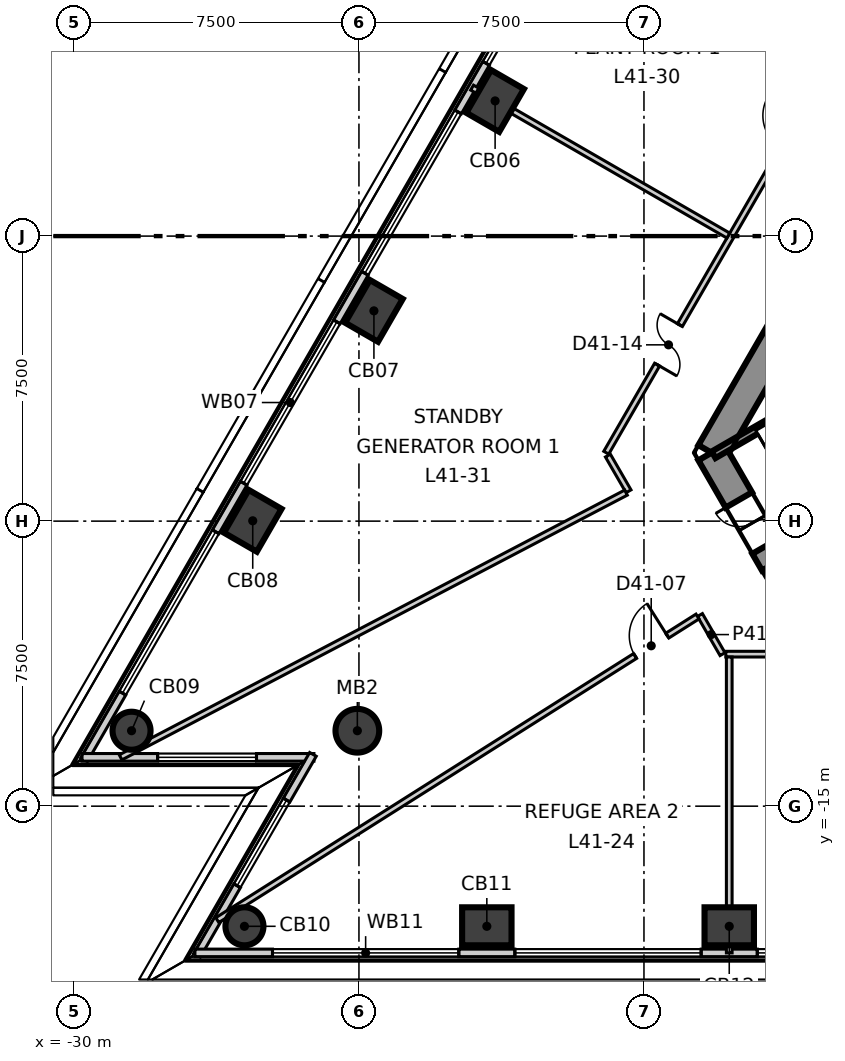
"""IFC4 building model, lengths in metres.
Left out: names, types, materials, properties, quantities, classifications, styles, units other than length and angle.
Written with IfcOpenShell. Run it as: python <this file> out.ifc"""

import sys

from ifc_helpers import new_model, si_unit, direction, frame, frame_2d, origin, origin_2d, place, context, subcontext, project, spatial, polyline, rectangle, circle, outline, extrude, element, fill, save


model = new_model("IFC4")
c1 = context("Model", 3, precision=1e-05, world=origin(), true_north=direction((0.0, 1.0)))
c2 = subcontext(c1, "Body", "Model", "MODEL_VIEW")
j1 = project(units=[si_unit("LENGTHUNIT", "METRE"), si_unit("PLANEANGLEUNIT", "RADIAN")], contexts=[c1])
p1 = place(None, origin())
s1 = spatial("IfcSite", under=j1, at=p1, CompositionType="ELEMENT")
p2 = place(p1, origin())
s2 = spatial("IfcBuilding", under=s1, at=p2, CompositionType="ELEMENT")
p3 = place(p2, frame((0.0, 0.0, 176.3)))
s3 = spatial("IfcBuildingStorey", under=s2, at=p3, CompositionType="ELEMENT", Elevation=176.3)
p4 = place(p3, frame((-1.674, 14.3, -0.3), z_axis=(0.0, 0.0, 1.0), x_axis=(-0.499995765644, -0.866027848477, 0.0)))
e1 = element("IfcWall", 1, at=p4, inside=s3, PredefinedType="SHEAR", context=c2, shape_type="SweptSolid", body=[
    extrude(outline(polyline([(-0.231, -0.4), (1.732, -0.4), (3.695, -0.4), (5.658, -0.4), (7.621, -0.4), (9.584, -0.4), (11.547, -0.4), (13.51, -0.4), (15.473, -0.4), (17.436, -0.4), (19.399, -0.4), (21.362, -0.4), (23.325, -0.4), (22.863, 0.4), (20.977, 0.4), (19.091, 0.4), (17.205, 0.4), (15.319, 0.4), (13.433, 0.4), (11.547, 0.4), (9.661, 0.4), (7.775, 0.4), (5.889, 0.4), (4.003, 0.4), (2.117, 0.4), (0.231, 0.4), (-0.231, -0.4)])), origin(), (0.0, 0.0, 1.0), 4.2),
])
p5 = place(p4, frame((10.997, 0.0, 0.3)))
e2 = element("IfcOpeningElement", 2, at=p5, cuts=e1, PredefinedType="OPENING", context=c2, shape_type="SweptSolid", body=[
    extrude(rectangle(XDim=1.1, YDim=2.1, at=frame_2d((0.55, 1.05))), frame((0.0, 0.41, 0.0), z_axis=(0.0, -1.0, 0.0), x_axis=(1.0, 0.0, 0.0)), (0.0, 0.0, 1.0), 0.82),
])
p6 = place(p3, frame((-13.221, -5.7, -0.3), z_axis=(0.0, 0.0, 1.0), x_axis=(0.49987182685, -0.866099391942, 0.0)))
e3 = element("IfcWall", 3, at=p6, inside=s3, PredefinedType="SHEAR", context=c2, shape_type="SweptSolid", body=[
    extrude(outline(polyline([(-0.231, -0.4), (1.674, -0.4), (3.579, -0.4), (3.118, 0.4), (1.674, 0.4), (0.231, 0.4), (-0.231, -0.4)])), origin(), (0.0, 0.0, 1.0), 4.2),
])
p7 = place(p6, frame((1.437, 0.0, 0.3)))
e4 = element("IfcOpeningElement", 4, at=p7, cuts=e3, PredefinedType="OPENING", context=c2, shape_type="SweptSolid", body=[
    extrude(rectangle(XDim=1.4, YDim=2.1, at=frame_2d((0.7, 1.05))), frame((0.0, 0.41, 0.0), z_axis=(0.0, -1.0, 0.0), x_axis=(1.0, 0.0, 0.0)), (0.0, 0.0, 1.0), 0.82),
])
for number, where, z_axis, x_axis in (
    (5, (-18.917, 3.557, -0.3), (0.0, 0.0, 1.0), (0.5, 0.866, 0.0)),
    (6, (-22.106, -1.967, -0.3), (0.0, 0.0, 1.0), (0.5, 0.866, 0.0)),
    (7, (-25.295, -7.491, -0.3), (0.0, 0.0, 1.0), (0.5, 0.866, 0.0)),
):
    element("IfcColumn", number, at=place(p3, frame(where, z_axis=z_axis, x_axis=x_axis)), inside=s3, PredefinedType="COLUMN", context=c2, shape_type="SweptSolid", body=[
        extrude(rectangle(XDim=1.3, YDim=1.0, at=origin_2d()), origin(), (0.0, 0.0, 1.0), 4.2),
    ])
for number, where, z_axis, x_axis in (
    (8, (-28.484, -13.015, -0.3), (0.0, 0.0, 1.0), (0.5, 0.866, 0.0)),
    (9, (-25.513, -18.161, -0.3), (0.0, 0.0, 1.0), (1.0, 0.0, 0.0)),
):
    element("IfcColumn", number, at=place(p3, frame(where, z_axis=z_axis, x_axis=x_axis)), inside=s3, PredefinedType="COLUMN", context=c2, shape_type="SweptSolid", body=[
        extrude(circle(Radius=0.5, at=origin_2d()), origin(), (0.0, 0.0, 1.0), 4.2),
    ])
for number, where, z_axis, x_axis in (
    (10, (-19.135, -18.161, -0.3), (0.0, 0.0, 1.0), (1.0, 0.0, 0.0)),
    (11, (-12.756, -18.161, -0.3), (0.0, 0.0, 1.0), (1.0, 0.0, 0.0)),
):
    element("IfcColumn", number, at=place(p3, frame(where, z_axis=z_axis, x_axis=x_axis)), inside=s3, PredefinedType="COLUMN", context=c2, shape_type="SweptSolid", body=[
        extrude(rectangle(XDim=1.3, YDim=1.0, at=origin_2d()), origin(), (0.0, 0.0, 1.0), 4.2),
    ])
p8 = place(p3, frame((-22.542, -13.015, -0.3), z_axis=(0.0, 0.0, 1.0), x_axis=(1.0, 0.0, 0.0)))
e12 = element("IfcColumn", 12, at=p8, inside=s3, PredefinedType="COLUMN", context=c2, shape_type="SweptSolid", body=[
    extrude(circle(Radius=0.575, at=origin_2d()), origin(), (0.0, 0.0, 1.0), 4.2),
])
p9 = place(p3, frame((-2.926, 32.654, 0.0), z_axis=(0.0, 0.0, 1.0), x_axis=(-0.499994049952, -0.866028839019, 0.0)))
e13 = element("IfcWall", 13, at=p9, inside=s3, PredefinedType="ELEMENTEDWALL", context=c2, shape_type="SweptSolid", body=[
    extrude(rectangle(XDim=53.613, YDim=0.2, at=frame_2d((26.806, 0.0))), origin(), (0.0, 0.0, 1.0), 3.9),
])
p10 = place(p9, frame((2.042, 0.0, 0.9)))
e14 = element("IfcOpeningElement", 14, at=p10, cuts=e13, PredefinedType="OPENING", context=c2, shape_type="SweptSolid", body=[
    extrude(rectangle(XDim=4.9, YDim=2.5, at=frame_2d((2.45, 1.25))), frame((0.0, 0.11, 0.0), z_axis=(0.0, -1.0, 0.0), x_axis=(1.0, 0.0, 0.0)), (0.0, 0.0, 1.0), 0.22),
])
p11 = place(p9, frame((8.42, 0.0, 0.9)))
e15 = element("IfcOpeningElement", 15, at=p11, cuts=e13, PredefinedType="OPENING", context=c2, shape_type="SweptSolid", body=[
    extrude(rectangle(XDim=4.9, YDim=2.5, at=frame_2d((2.45, 1.25))), frame((0.0, 0.11, 0.0), z_axis=(0.0, -1.0, 0.0), x_axis=(1.0, 0.0, 0.0)), (0.0, 0.0, 1.0), 0.22),
])
p12 = place(p9, frame((14.798, 0.0, 0.9)))
e16 = element("IfcOpeningElement", 16, at=p12, cuts=e13, PredefinedType="OPENING", context=c2, shape_type="SweptSolid", body=[
    extrude(rectangle(XDim=4.9, YDim=2.5, at=frame_2d((2.45, 1.25))), frame((0.0, 0.11, 0.0), z_axis=(0.0, -1.0, 0.0), x_axis=(1.0, 0.0, 0.0)), (0.0, 0.0, 1.0), 0.22),
])
p13 = place(p9, frame((21.177, 0.0, 0.9)))
e17 = element("IfcOpeningElement", 17, at=p13, cuts=e13, PredefinedType="OPENING", context=c2, shape_type="SweptSolid", body=[
    extrude(rectangle(XDim=4.9, YDim=2.5, at=frame_2d((2.45, 1.25))), frame((0.0, 0.11, 0.0), z_axis=(0.0, -1.0, 0.0), x_axis=(1.0, 0.0, 0.0)), (0.0, 0.0, 1.0), 0.22),
])
p14 = place(p9, frame((27.555, 0.0, 0.9)))
e18 = element("IfcOpeningElement", 18, at=p14, cuts=e13, PredefinedType="OPENING", context=c2, shape_type="SweptSolid", body=[
    extrude(rectangle(XDim=4.9, YDim=2.5, at=frame_2d((2.45, 1.25))), frame((0.0, 0.11, 0.0), z_axis=(0.0, -1.0, 0.0), x_axis=(1.0, 0.0, 0.0)), (0.0, 0.0, 1.0), 0.22),
])
p15 = place(p9, frame((33.934, 0.0, 0.9)))
e19 = element("IfcOpeningElement", 19, at=p15, cuts=e13, PredefinedType="OPENING", context=c2, shape_type="SweptSolid", body=[
    extrude(rectangle(XDim=4.9, YDim=2.5, at=frame_2d((2.45, 1.25))), frame((0.0, 0.11, 0.0), z_axis=(0.0, -1.0, 0.0), x_axis=(1.0, 0.0, 0.0)), (0.0, 0.0, 1.0), 0.22),
])
p16 = place(p9, frame((40.312, 0.0, 0.9)))
e20 = element("IfcOpeningElement", 20, at=p16, cuts=e13, PredefinedType="OPENING", context=c2, shape_type="SweptSolid", body=[
    extrude(rectangle(XDim=4.9, YDim=2.5, at=frame_2d((2.45, 1.25))), frame((0.0, 0.11, 0.0), z_axis=(0.0, -1.0, 0.0), x_axis=(1.0, 0.0, 0.0)), (0.0, 0.0, 1.0), 0.22),
])
p17 = place(p9, frame((46.69, 0.0, 0.9)))
e21 = element("IfcOpeningElement", 21, at=p17, cuts=e13, PredefinedType="OPENING", context=c2, shape_type="SweptSolid", body=[
    extrude(rectangle(XDim=4.9, YDim=2.5, at=frame_2d((2.45, 1.25))), frame((0.0, 0.11, 0.0), z_axis=(0.0, -1.0, 0.0), x_axis=(1.0, 0.0, 0.0)), (0.0, 0.0, 1.0), 0.22),
])
p18 = place(p3, frame((-29.787, -13.715, 0.0), z_axis=(0.0, 0.0, 1.0), x_axis=(1.0, 0.0, 0.0)))
e22 = element("IfcWall", 22, at=p18, inside=s3, PredefinedType="ELEMENTEDWALL", context=c2, shape_type="SweptSolid", body=[
    extrude(rectangle(XDim=6.102, YDim=0.2, at=frame_2d((3.051, 0.0))), origin(), (0.0, 0.0, 1.0), 3.9),
])
p19 = place(p18, frame((1.99, 0.0, 0.9)))
e23 = element("IfcOpeningElement", 23, at=p19, cuts=e22, PredefinedType="OPENING", context=c2, shape_type="SweptSolid", body=[
    extrude(rectangle(XDim=2.6, YDim=2.5, at=frame_2d((1.3, 1.25))), frame((0.0, 0.11, 0.0), z_axis=(0.0, -1.0, 0.0), x_axis=(1.0, 0.0, 0.0)), (0.0, 0.0, 1.0), 0.22),
])
p20 = place(p3, frame((-23.71, -13.637, 0.0), z_axis=(0.0, 0.0, 1.0), x_axis=(-0.49995563381, -0.866051017101, 0.0)))
e24 = element("IfcWall", 24, at=p20, inside=s3, PredefinedType="ELEMENTEDWALL", context=c2, shape_type="SweptSolid", body=[
    extrude(rectangle(XDim=6.103, YDim=0.2, at=frame_2d((3.051, 0.0))), origin(), (0.0, 0.0, 1.0), 3.9),
])
p21 = place(p20, frame((1.39, 0.0, 0.9)))
e25 = element("IfcOpeningElement", 25, at=p21, cuts=e24, PredefinedType="OPENING", context=c2, shape_type="SweptSolid", body=[
    extrude(rectangle(XDim=2.6, YDim=2.5, at=frame_2d((1.3, 1.25))), frame((0.0, 0.11, 0.0), z_axis=(0.0, -1.0, 0.0), x_axis=(1.0, 0.0, 0.0)), (0.0, 0.0, 1.0), 0.22),
])
p22 = place(p3, frame((-26.816, -18.861, 0.0), z_axis=(0.0, 0.0, 1.0), x_axis=(1.0, 0.0, 0.0)))
e26 = element("IfcWall", 26, at=p22, inside=s3, PredefinedType="ELEMENTEDWALL", context=c2, shape_type="SweptSolid", body=[
    extrude(rectangle(XDim=53.612, YDim=0.2, at=frame_2d((26.806, 0.0))), origin(), (0.0, 0.0, 1.0), 3.9),
])
p23 = place(p22, frame((2.042, 0.0, 0.9)))
e27 = element("IfcOpeningElement", 27, at=p23, cuts=e26, PredefinedType="OPENING", context=c2, shape_type="SweptSolid", body=[
    extrude(rectangle(XDim=4.9, YDim=2.5, at=frame_2d((2.45, 1.25))), frame((0.0, 0.11, 0.0), z_axis=(0.0, -1.0, 0.0), x_axis=(1.0, 0.0, 0.0)), (0.0, 0.0, 1.0), 0.22),
])
p24 = place(p22, frame((8.42, 0.0, 0.9)))
e28 = element("IfcOpeningElement", 28, at=p24, cuts=e26, PredefinedType="OPENING", context=c2, shape_type="SweptSolid", body=[
    extrude(rectangle(XDim=4.9, YDim=2.5, at=frame_2d((2.45, 1.25))), frame((0.0, 0.11, 0.0), z_axis=(0.0, -1.0, 0.0), x_axis=(1.0, 0.0, 0.0)), (0.0, 0.0, 1.0), 0.22),
])
p25 = place(p22, frame((14.799, 0.0, 0.9)))
e29 = element("IfcOpeningElement", 29, at=p25, cuts=e26, PredefinedType="OPENING", context=c2, shape_type="SweptSolid", body=[
    extrude(rectangle(XDim=4.9, YDim=2.5, at=frame_2d((2.45, 1.25))), frame((0.0, 0.11, 0.0), z_axis=(0.0, -1.0, 0.0), x_axis=(1.0, 0.0, 0.0)), (0.0, 0.0, 1.0), 0.22),
])
p26 = place(p22, frame((21.177, 0.0, 0.9)))
e30 = element("IfcOpeningElement", 30, at=p26, cuts=e26, PredefinedType="OPENING", context=c2, shape_type="SweptSolid", body=[
    extrude(rectangle(XDim=4.9, YDim=2.5, at=frame_2d((2.45, 1.25))), frame((0.0, 0.11, 0.0), z_axis=(0.0, -1.0, 0.0), x_axis=(1.0, 0.0, 0.0)), (0.0, 0.0, 1.0), 0.22),
])
p27 = place(p22, frame((27.555, 0.0, 0.9)))
e31 = element("IfcOpeningElement", 31, at=p27, cuts=e26, PredefinedType="OPENING", context=c2, shape_type="SweptSolid", body=[
    extrude(rectangle(XDim=4.9, YDim=2.5, at=frame_2d((2.45, 1.25))), frame((0.0, 0.11, 0.0), z_axis=(0.0, -1.0, 0.0), x_axis=(1.0, 0.0, 0.0)), (0.0, 0.0, 1.0), 0.22),
])
p28 = place(p22, frame((33.933, 0.0, 0.9)))
e32 = element("IfcOpeningElement", 32, at=p28, cuts=e26, PredefinedType="OPENING", context=c2, shape_type="SweptSolid", body=[
    extrude(rectangle(XDim=4.9, YDim=2.5, at=frame_2d((2.45, 1.25))), frame((0.0, 0.11, 0.0), z_axis=(0.0, -1.0, 0.0), x_axis=(1.0, 0.0, 0.0)), (0.0, 0.0, 1.0), 0.22),
])
p29 = place(p22, frame((40.312, 0.0, 0.9)))
e33 = element("IfcOpeningElement", 33, at=p29, cuts=e26, PredefinedType="OPENING", context=c2, shape_type="SweptSolid", body=[
    extrude(rectangle(XDim=4.9, YDim=2.5, at=frame_2d((2.45, 1.25))), frame((0.0, 0.11, 0.0), z_axis=(0.0, -1.0, 0.0), x_axis=(1.0, 0.0, 0.0)), (0.0, 0.0, 1.0), 0.22),
])
p30 = place(p22, frame((46.69, 0.0, 0.9)))
e34 = element("IfcOpeningElement", 34, at=p30, cuts=e26, PredefinedType="OPENING", context=c2, shape_type="SweptSolid", body=[
    extrude(rectangle(XDim=4.9, YDim=2.5, at=frame_2d((2.45, 1.25))), frame((0.0, 0.11, 0.0), z_axis=(0.0, -1.0, 0.0), x_axis=(1.0, 0.0, 0.0)), (0.0, 0.0, 1.0), 0.22),
])
p31 = place(p3, frame((-15.993, -5.7, 0.0), z_axis=(0.0, 0.0, 1.0), x_axis=(0.500007877715, 0.866020855536, 0.0)))
e35 = element("IfcWall", 35, at=p31, inside=s3, PredefinedType="PARTITIONING", context=c2, shape_type="SweptSolid", body=[
    extrude(rectangle(XDim=25.865, YDim=0.15, at=frame_2d((12.933, 0.0))), origin(), (0.0, 0.0, 1.0), 3.9),
])
p32 = place(p31, frame((21.988, 0.0, 0.0)))
e36 = element("IfcOpeningElement", 36, at=p32, cuts=e35, PredefinedType="OPENING", context=c2, shape_type="SweptSolid", body=[
    extrude(rectangle(XDim=1.2, YDim=2.1, at=frame_2d((0.6, 1.05))), frame((0.0, 0.085, 0.0), z_axis=(0.0, -1.0, 0.0), x_axis=(1.0, 0.0, 0.0)), (0.0, 0.0, 1.0), 0.17),
])
p33 = place(p31, frame((15.622, 0.0, 0.0)))
e37 = element("IfcOpeningElement", 37, at=p33, cuts=e35, PredefinedType="OPENING", context=c2, shape_type="SweptSolid", body=[
    extrude(rectangle(XDim=1.0, YDim=2.1, at=frame_2d((0.5, 1.05))), frame((0.0, 0.085, 0.0), z_axis=(0.0, -1.0, 0.0), x_axis=(1.0, 0.0, 0.0)), (0.0, 0.0, 1.0), 0.17),
])
p34 = place(p31, frame((9.244, 0.0, 0.0)))
e38 = element("IfcOpeningElement", 38, at=p34, cuts=e35, PredefinedType="OPENING", context=c2, shape_type="SweptSolid", body=[
    extrude(rectangle(XDim=1.0, YDim=2.1, at=frame_2d((0.5, 1.05))), frame((0.0, 0.085, 0.0), z_axis=(0.0, -1.0, 0.0), x_axis=(1.0, 0.0, 0.0)), (0.0, 0.0, 1.0), 0.17),
])
p35 = place(p31, frame((2.678, 0.0, 0.0)))
e39 = element("IfcOpeningElement", 39, at=p35, cuts=e35, PredefinedType="OPENING", context=c2, shape_type="SweptSolid", body=[
    extrude(rectangle(XDim=1.2, YDim=2.1, at=frame_2d((0.6, 1.05))), frame((0.0, 0.085, 0.0), z_axis=(0.0, -1.0, 0.0), x_axis=(1.0, 0.0, 0.0)), (0.0, 0.0, 1.0), 0.17),
])
p36 = place(p3, frame((-15.949, -5.775, 0.0), z_axis=(0.0, 0.0, 1.0), x_axis=(0.5001052534, -0.865964627177, 0.0)))
e40 = element("IfcWall", 40, at=p36, inside=s3, PredefinedType="PARTITIONING", context=c2, shape_type="SweptSolid", body=[
    extrude(rectangle(XDim=1.086, YDim=0.15, at=frame_2d((0.543, 0.0))), origin(), (0.0, 0.0, 1.0), 3.9),
])
p37 = place(p3, frame((-13.527, -9.97, 0.0), z_axis=(0.0, 0.0, 1.0), x_axis=(0.499562467058, -0.866277866222, 0.0)))
e41 = element("IfcWall", 41, at=p37, inside=s3, PredefinedType="PARTITIONING", context=c2, shape_type="SweptSolid", body=[
    extrude(rectangle(XDim=1.189, YDim=0.15, at=frame_2d((0.594, 0.0))), origin(), (0.0, 0.0, 1.0), 3.9),
])
p38 = place(p3, frame((-28.772, -13.715, 0.0), z_axis=(0.0, 0.0, 1.0), x_axis=(0.885861453931, 0.463949872766, 0.0)))
e42 = element("IfcWall", 42, at=p38, inside=s3, PredefinedType="PARTITIONING", context=c2, shape_type="SweptSolid", body=[
    extrude(rectangle(XDim=15.013, YDim=0.15, at=frame_2d((7.506, 0.0))), origin(), (0.0, 0.0, 1.0), 3.2),
])
p39 = place(p3, frame((-26.227, -17.998, 0.0), z_axis=(0.0, 0.0, 1.0), x_axis=(0.845264910481, 0.534347481616, 0.0)))
e43 = element("IfcWall", 43, at=p39, inside=s3, PredefinedType="PARTITIONING", context=c2, shape_type="SweptSolid", body=[
    extrude(rectangle(XDim=14.949, YDim=0.15, at=frame_2d((7.475, 0.0))), origin(), (0.0, 0.0, 1.0), 3.2),
])
p40 = place(p39, frame((13.008, 0.0, 0.0)))
e44 = element("IfcOpeningElement", 44, at=p40, cuts=e43, PredefinedType="OPENING", context=c2, shape_type="SweptSolid", body=[
    extrude(rectangle(XDim=1.0, YDim=2.1, at=frame_2d((0.5, 1.05))), frame((0.0, 0.085, 0.0), z_axis=(0.0, -1.0, 0.0), x_axis=(1.0, 0.0, 0.0)), (0.0, 0.0, 1.0), 0.17),
])
p41 = place(p3, frame((-12.846, -11.0, 0.0), z_axis=(0.0, 0.0, 1.0), x_axis=(1.0, 0.0, 0.0)))
e45 = element("IfcWall", 45, at=p41, inside=s3, PredefinedType="PARTITIONING", context=c2, shape_type="SweptSolid", body=[
    extrude(rectangle(XDim=25.779, YDim=0.15, at=frame_2d((12.89, 0.0))), origin(), (0.0, 0.0, 1.0), 3.9),
])
p42 = place(p41, frame((5.868, 0.0, 0.0)))
e46 = element("IfcOpeningElement", 46, at=p42, cuts=e45, PredefinedType="OPENING", context=c2, shape_type="SweptSolid", body=[
    extrude(rectangle(XDim=1.2, YDim=2.1, at=frame_2d((0.6, 1.05))), frame((0.0, 0.085, 0.0), z_axis=(0.0, -1.0, 0.0), x_axis=(1.0, 0.0, 0.0)), (0.0, 0.0, 1.0), 0.17),
])
p43 = place(p41, frame((18.624, 0.0, 0.0)))
e47 = element("IfcOpeningElement", 47, at=p43, cuts=e45, PredefinedType="OPENING", context=c2, shape_type="SweptSolid", body=[
    extrude(rectangle(XDim=1.2, YDim=2.1, at=frame_2d((0.6, 1.05))), frame((0.0, 0.085, 0.0), z_axis=(0.0, -1.0, 0.0), x_axis=(1.0, 0.0, 0.0)), (0.0, 0.0, 1.0), 0.17),
])
for number, where, z_axis, x_axis in (
    (48, (-19.523, 3.907, 0.0), (0.0, 0.0, 1.0), (0.866, -0.5, 0.0)),
    (49, (-12.756, -18.861, 0.0), (0.0, 0.0, 1.0), (0.0, 1.0, 0.0)),
):
    element("IfcWall", number, at=place(p3, frame(where, z_axis=z_axis, x_axis=x_axis)), inside=s3, PredefinedType="PARTITIONING", context=c2, shape_type="SweptSolid", body=[
        extrude(rectangle(XDim=7.786, YDim=0.15, at=frame_2d((3.893, 0.0))), origin(), (0.0, 0.0, 1.0), 3.9),
    ])
p44 = place(p3, frame((-13.167, -5.754, 0.0), z_axis=(0.0, 0.0, 1.0), x_axis=(0.866060938598, 0.499938446846, 0.0)))
e50 = element("IfcWall", 50, at=p44, inside=s3, PredefinedType="SOLIDWALL", context=c2, shape_type="SweptSolid", body=[
    extrude(rectangle(XDim=7.665, YDim=0.2, at=frame_2d((3.832, 0.0))), origin(), (0.0, 0.0, 1.0), 3.9),
])
p45 = place(p14, origin())
e51 = element("IfcWindow", 51, at=p45, inside=s3, PartitioningType="SINGLE_PANEL", PredefinedType="WINDOW", context=c2, shape_type="SweptSolid", body=[
    extrude(rectangle(XDim=4.9, YDim=2.5, at=frame_2d((2.45, 1.25))), frame((0.0, 0.03, 0.0), z_axis=(0.0, -1.0, 0.0), x_axis=(1.0, 0.0, 0.0)), (0.0, 0.0, 1.0), 0.06),
])
fill(e18, e51)
p46 = place(p15, origin())
e52 = element("IfcWindow", 52, at=p46, inside=s3, PartitioningType="SINGLE_PANEL", PredefinedType="WINDOW", context=c2, shape_type="SweptSolid", body=[
    extrude(rectangle(XDim=4.9, YDim=2.5, at=frame_2d((2.45, 1.25))), frame((0.0, 0.03, 0.0), z_axis=(0.0, -1.0, 0.0), x_axis=(1.0, 0.0, 0.0)), (0.0, 0.0, 1.0), 0.06),
])
fill(e19, e52)
p47 = place(p16, origin())
e53 = element("IfcWindow", 53, at=p47, inside=s3, PartitioningType="SINGLE_PANEL", PredefinedType="WINDOW", context=c2, shape_type="SweptSolid", body=[
    extrude(rectangle(XDim=4.9, YDim=2.5, at=frame_2d((2.45, 1.25))), frame((0.0, 0.03, 0.0), z_axis=(0.0, -1.0, 0.0), x_axis=(1.0, 0.0, 0.0)), (0.0, 0.0, 1.0), 0.06),
])
fill(e20, e53)
p48 = place(p17, origin())
e54 = element("IfcWindow", 54, at=p48, inside=s3, PartitioningType="SINGLE_PANEL", PredefinedType="WINDOW", context=c2, shape_type="SweptSolid", body=[
    extrude(rectangle(XDim=4.9, YDim=2.5, at=frame_2d((2.45, 1.25))), frame((0.0, 0.03, 0.0), z_axis=(0.0, -1.0, 0.0), x_axis=(1.0, 0.0, 0.0)), (0.0, 0.0, 1.0), 0.06),
])
fill(e21, e54)
p49 = place(p19, origin())
e55 = element("IfcWindow", 55, at=p49, inside=s3, PartitioningType="SINGLE_PANEL", PredefinedType="WINDOW", context=c2, shape_type="SweptSolid", body=[
    extrude(rectangle(XDim=2.6, YDim=2.5, at=frame_2d((1.3, 1.25))), frame((0.0, 0.03, 0.0), z_axis=(0.0, -1.0, 0.0), x_axis=(1.0, 0.0, 0.0)), (0.0, 0.0, 1.0), 0.06),
])
fill(e23, e55)
p50 = place(p21, origin())
e56 = element("IfcWindow", 56, at=p50, inside=s3, PartitioningType="SINGLE_PANEL", PredefinedType="WINDOW", context=c2, shape_type="SweptSolid", body=[
    extrude(rectangle(XDim=2.6, YDim=2.5, at=frame_2d((1.3, 1.25))), frame((0.0, 0.03, 0.0), z_axis=(0.0, -1.0, 0.0), x_axis=(1.0, 0.0, 0.0)), (0.0, 0.0, 1.0), 0.06),
])
fill(e25, e56)
p51 = place(p23, origin())
e57 = element("IfcWindow", 57, at=p51, inside=s3, PartitioningType="SINGLE_PANEL", PredefinedType="WINDOW", context=c2, shape_type="SweptSolid", body=[
    extrude(rectangle(XDim=4.9, YDim=2.5, at=frame_2d((2.45, 1.25))), frame((0.0, 0.03, 0.0), z_axis=(0.0, -1.0, 0.0), x_axis=(1.0, 0.0, 0.0)), (0.0, 0.0, 1.0), 0.06),
])
fill(e27, e57)
p52 = place(p24, origin())
e58 = element("IfcWindow", 58, at=p52, inside=s3, PartitioningType="SINGLE_PANEL", PredefinedType="WINDOW", context=c2, shape_type="SweptSolid", body=[
    extrude(rectangle(XDim=4.9, YDim=2.5, at=frame_2d((2.45, 1.25))), frame((0.0, 0.03, 0.0), z_axis=(0.0, -1.0, 0.0), x_axis=(1.0, 0.0, 0.0)), (0.0, 0.0, 1.0), 0.06),
])
fill(e28, e58)
p53 = place(p25, origin())
e59 = element("IfcWindow", 59, at=p53, inside=s3, PartitioningType="SINGLE_PANEL", PredefinedType="WINDOW", context=c2, shape_type="SweptSolid", body=[
    extrude(rectangle(XDim=4.9, YDim=2.5, at=frame_2d((2.45, 1.25))), frame((0.0, 0.03, 0.0), z_axis=(0.0, -1.0, 0.0), x_axis=(1.0, 0.0, 0.0)), (0.0, 0.0, 1.0), 0.06),
])
fill(e29, e59)
p54 = place(p40, origin())
e60 = element("IfcDoor", 60, at=p54, inside=s3, OperationType="SINGLE_SWING_LEFT", PredefinedType="DOOR", context=c2, shape_type="SweptSolid", body=[
    extrude(rectangle(XDim=1.0, YDim=2.1, at=frame_2d((0.5, 1.05))), frame((0.0, 0.025, 0.0), z_axis=(0.0, -1.0, 0.0), x_axis=(1.0, 0.0, 0.0)), (0.0, 0.0, 1.0), 0.05),
])
fill(e44, e60)
p55 = place(p35, origin())
e61 = element("IfcDoor", 61, at=p55, inside=s3, OperationType="DOUBLE_DOOR_SINGLE_SWING", PredefinedType="DOOR", context=c2, shape_type="SweptSolid", body=[
    extrude(rectangle(XDim=1.2, YDim=2.1, at=frame_2d((0.6, 1.05))), frame((0.0, 0.025, 0.0), z_axis=(0.0, -1.0, 0.0), x_axis=(1.0, 0.0, 0.0)), (0.0, 0.0, 1.0), 0.05),
])
fill(e39, e61)
p56 = place(p7, origin())
e62 = element("IfcDoor", 62, at=p56, inside=s3, OperationType="DOUBLE_DOOR_SINGLE_SWING", PredefinedType="DOOR", context=c2, shape_type="SweptSolid", body=[
    extrude(rectangle(XDim=1.4, YDim=2.1, at=frame_2d((0.7, 1.05))), frame((0.0, 0.025, 0.0), z_axis=(0.0, -1.0, 0.0), x_axis=(1.0, 0.0, 0.0)), (0.0, 0.0, 1.0), 0.05),
])
fill(e4, e62)
save(model, sys.argv[1])
